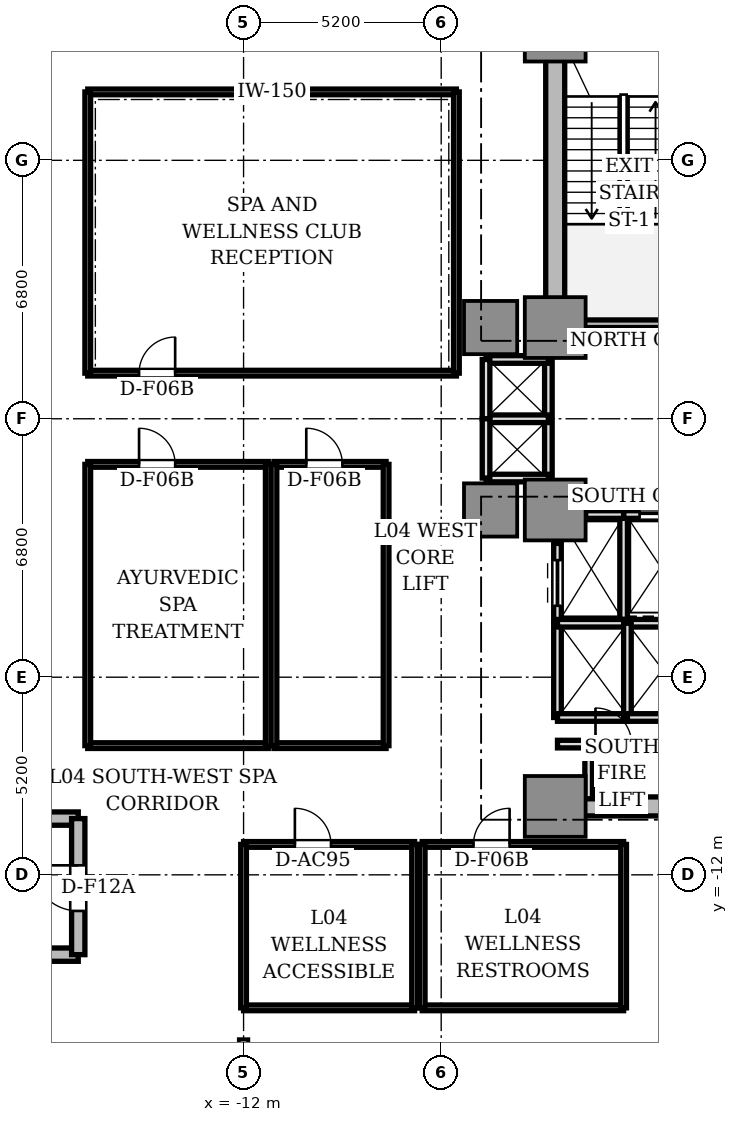
"""IFC4 building model, lengths in metres.
Left out: names, types, materials, properties, quantities, classifications, styles, units other than length and angle.
Written with IfcOpenShell. Run it as: python <this file> out.ifc"""

import sys

from ifc_helpers import new_model, si_unit, direction, frame, frame_2d, origin, origin_2d, place, context, subcontext, project, spatial, rectangle, i_section, extrude, source, transform, mapped, element, fill, save


model = new_model("IFC4")
c1 = context("Model", 3, precision=1e-05, world=origin(), true_north=direction((0.0, 1.0)))
c2 = subcontext(c1, "Body", "Model", "MODEL_VIEW")
j1 = project(units=[si_unit("LENGTHUNIT", "METRE"), si_unit("PLANEANGLEUNIT", "RADIAN")], contexts=[c1])
p1 = place(None, origin())
s1 = spatial("IfcSite", under=j1, at=p1, CompositionType="ELEMENT")
p2 = place(p1, origin())
s2 = spatial("IfcBuilding", under=s1, at=p2, CompositionType="ELEMENT")
p3 = place(p2, frame((0.0, 0.0, 18.6)))
s3 = spatial("IfcBuildingStorey", under=s2, at=p3, CompositionType="ELEMENT", Elevation=18.6)
p4 = place(p3, frame((-3.8, 2.85, 0.0), z_axis=(0.0, 0.0, 1.0), x_axis=(0.0, 1.0, 0.0)))
e1 = element("IfcWall", 1, at=p4, inside=s3, PredefinedType="SHEAR", context=c2, shape_type="SweptSolid", body=[
    extrude(rectangle(XDim=6.9, YDim=0.5, at=frame_2d((3.45, 0.0))), origin(), (0.0, 0.0, 1.0), 4.26),
])
p5 = place(p3, frame((-3.55, -10.2, 0.0), z_axis=(0.0, 0.0, 1.0), x_axis=(1.0, 0.0, 0.0)))
e2 = element("IfcWall", 2, at=p5, inside=s3, PredefinedType="SHEAR", context=c2, shape_type="SweptSolid", body=[
    extrude(rectangle(XDim=7.1, YDim=0.5, at=frame_2d((3.55, 0.0))), origin(), (0.0, 0.0, 1.0), 4.26),
])
m1 = source(origin(), c2, "Body", "SweptSolid", [
    extrude(rectangle(XDim=1.6, YDim=1.6, at=origin_2d()), origin(), (0.0, 0.0, 1.0), 4.26),
])
for number, where, z_axis, x_axis in (
    (3, (-3.8, 2.4, 0.0), (0.0, 0.0, 1.0), (1.0, 0.0, 0.0)),
    (4, (-3.8, 10.2, 0.0), (0.0, 0.0, 1.0), (1.0, 0.0, 0.0)),
    (5, (-3.8, -2.4, 0.0), (0.0, 0.0, 1.0), (1.0, 0.0, 0.0)),
    (6, (-3.8, -10.2, 0.0), (0.0, 0.0, 1.0), (1.0, 0.0, 0.0)),
):
    element("IfcColumn", number, at=place(p3, frame(where, z_axis=z_axis, x_axis=x_axis)), inside=s3, PredefinedType="COLUMN", context=c2, shape_type="MappedRepresentation", body=[
        mapped(m1, transform((0.0, 0.0, 0.0), scale=1.0)),
    ])
m2 = source(origin(), c2, "Body", "SweptSolid", [
    extrude(rectangle(XDim=1.4, YDim=1.4, at=origin_2d()), origin(), (0.0, 0.0, 1.0), 4.26),
])
for number, where, z_axis, x_axis in (
    (7, (-5.5, 2.4, 0.0), (0.0, 0.0, 1.0), (1.0, 0.0, 0.0)),
    (8, (-5.5, -2.4, 0.0), (0.0, 0.0, 1.0), (1.0, 0.0, 0.0)),
):
    element("IfcColumn", number, at=place(p3, frame(where, z_axis=z_axis, x_axis=x_axis)), inside=s3, PredefinedType="COLUMN", context=c2, shape_type="MappedRepresentation", body=[
        mapped(m2, transform((0.0, 0.0, 0.0), scale=1.0)),
    ])
m3 = source(origin(), c2, "Body", "SweptSolid", [
    extrude(i_section(OverallWidth=0.25, OverallDepth=0.35, WebThickness=0.012, FlangeThickness=0.012, FilletRadius=0.012, at=origin_2d()), origin(), (0.0, 0.0, 1.0), 4.26),
])
p6 = place(p3, frame((-12.0, -16.5, 0.0), z_axis=(0.0, 0.0, 1.0), x_axis=(1.0, 0.0, 0.0)))
e9 = element("IfcColumn", 9, at=p6, inside=s3, PredefinedType="COLUMN", context=c2, shape_type="MappedRepresentation", body=[
    mapped(m3, transform((0.0, 0.0, 0.0), scale=1.0)),
])
p7 = place(p3, frame((-3.72, 2.5, 0.0), z_axis=(0.0, 0.0, 1.0), x_axis=(1.0, 0.0, 0.0)))
e10 = element("IfcWall", 10, at=p7, inside=s3, PredefinedType="SOLIDWALL", context=c2, shape_type="SweptSolid", body=[
    extrude(rectangle(XDim=3.72, YDim=0.2, at=frame_2d((1.86, 0.0))), origin(), (0.0, 0.0, 1.0), 4.26),
])
p8 = place(p3, frame((-2.0, -5.28, 0.0), z_axis=(0.0, 0.0, 1.0), x_axis=(0.0, 1.0, 0.0)))
e11 = element("IfcWall", 11, at=p8, inside=s3, PredefinedType="SOLIDWALL", context=c2, shape_type="SweptSolid", body=[
    extrude(rectangle(XDim=2.78, YDim=0.2, at=frame_2d((1.39, 0.0))), origin(), (0.0, 0.0, 1.0), 3.81),
])
p9 = place(p3, frame((-2.0, -2.52, 0.0), z_axis=(0.0, 0.0, 1.0), x_axis=(1.0, 0.0, 0.0)))
e12 = element("IfcWall", 12, at=p9, inside=s3, PredefinedType="SOLIDWALL", context=c2, shape_type="SweptSolid", body=[
    extrude(rectangle(XDim=1.95, YDim=0.2, at=frame_2d((0.975, 0.0))), origin(), (0.0, 0.0, 1.0), 3.81),
])
p10 = place(p9, frame((0.42, 0.0, 0.0)))
e13 = element("IfcOpeningElement", 13, at=p10, cuts=e12, PredefinedType="OPENING", context=c2, shape_type="SweptSolid", body=[
    extrude(rectangle(XDim=1.1, YDim=2.2, at=frame_2d((0.55, 1.1))), frame((0.0, 0.11, 0.0), z_axis=(0.0, -1.0, 0.0), x_axis=(1.0, 0.0, 0.0)), (0.0, 0.0, 1.0), 0.22),
])
p11 = place(p3, frame((-3.0, -2.52, 0.0), z_axis=(0.0, 0.0, 1.0), x_axis=(1.0, 0.0, 0.0)))
e14 = element("IfcWall", 14, at=p11, inside=s3, PredefinedType="SOLIDWALL", context=c2, shape_type="SweptSolid", body=[
    extrude(rectangle(XDim=1.0, YDim=0.2, at=frame_2d((0.5, 0.0))), origin(), (0.0, 0.0, 1.0), 3.81),
])
p12 = place(p3, frame((-3.74, -5.36, 0.0), z_axis=(0.0, 0.0, 1.0), x_axis=(0.0, 1.0, 0.0)))
e15 = element("IfcWall", 15, at=p12, inside=s3, PredefinedType="SOLIDWALL", context=c2, shape_type="SweptSolid", body=[
    extrude(rectangle(XDim=2.08, YDim=0.2, at=frame_2d((1.04, 0.0))), origin(), (0.0, 0.0, 1.0), 3.81),
])
p13 = place(p12, frame((0.44, 0.0, 0.0)))
e16 = element("IfcOpeningElement", 16, at=p13, cuts=e15, PredefinedType="OPENING", context=c2, shape_type="SweptSolid", body=[
    extrude(rectangle(XDim=1.2, YDim=2.2, at=frame_2d((0.6, 1.1))), frame((0.0, 0.11, 0.0), z_axis=(0.0, -1.0, 0.0), x_axis=(1.0, 0.0, 0.0)), (0.0, 0.0, 1.0), 0.22),
])
p14 = place(p3, frame((-3.74, -7.86, 0.0), z_axis=(0.0, 0.0, 1.0), x_axis=(0.0, 1.0, 0.0)))
e17 = element("IfcWall", 17, at=p14, inside=s3, PredefinedType="SOLIDWALL", context=c2, shape_type="SweptSolid", body=[
    extrude(rectangle(XDim=2.48, YDim=0.2, at=frame_2d((1.24, 0.0))), origin(), (0.0, 0.0, 1.0), 3.81),
])
p15 = place(p3, frame((-3.74, -7.86, 0.0), z_axis=(0.0, 0.0, 1.0), x_axis=(1.0, 0.0, 0.0)))
e18 = element("IfcWall", 18, at=p15, inside=s3, PredefinedType="SOLIDWALL", context=c2, shape_type="SweptSolid", body=[
    extrude(rectangle(XDim=1.84, YDim=0.2, at=frame_2d((0.92, 0.0))), origin(), (0.0, 0.0, 1.0), 3.81),
])
p16 = place(p3, frame((-3.74, -5.38, 0.0), z_axis=(0.0, 0.0, 1.0), x_axis=(1.0, 0.0, 0.0)))
e19 = element("IfcWall", 19, at=p16, inside=s3, PredefinedType="SOLIDWALL", context=c2, shape_type="SweptSolid", body=[
    extrude(rectangle(XDim=3.69, YDim=0.2, at=frame_2d((1.845, 0.0))), origin(), (0.0, 0.0, 1.0), 3.81),
])
p17 = place(p3, frame((-1.9, -7.86, 0.0), z_axis=(0.0, 0.0, 1.0), x_axis=(0.0, 1.0, 0.0)))
e20 = element("IfcWall", 20, at=p17, inside=s3, PredefinedType="SOLIDWALL", context=c2, shape_type="SweptSolid", body=[
    extrude(rectangle(XDim=2.48, YDim=0.2, at=frame_2d((1.24, 0.0))), origin(), (0.0, 0.0, 1.0), 3.81),
])
p18 = place(p3, frame((-1.9, -7.86, 0.0), z_axis=(0.0, 0.0, 1.0), x_axis=(1.0, 0.0, 0.0)))
e21 = element("IfcWall", 21, at=p18, inside=s3, PredefinedType="SOLIDWALL", context=c2, shape_type="SweptSolid", body=[
    extrude(rectangle(XDim=1.85, YDim=0.2, at=frame_2d((0.925, 0.0))), origin(), (0.0, 0.0, 1.0), 3.81),
])
p19 = place(p3, frame((-3.98, -1.56, 0.0), z_axis=(0.0, 0.0, 1.0), x_axis=(0.0, 1.0, 0.0)))
e22 = element("IfcWall", 22, at=p19, inside=s3, PredefinedType="SOLIDWALL", context=c2, shape_type="SweptSolid", body=[
    extrude(rectangle(XDim=3.12, YDim=0.2, at=frame_2d((1.56, 0.0))), origin(), (0.0, 0.0, 1.0), 3.33),
])
for number, where, z_axis, x_axis in (
    (23, (-5.62, 1.56, 0.0), (0.0, 0.0, 1.0), (1.0, 0.0, 0.0)),
    (24, (-5.62, -1.56, 0.0), (0.0, 0.0, 1.0), (1.0, 0.0, 0.0)),
    (25, (-5.62, 0.0, 0.0), (0.0, 0.0, 1.0), (1.0, 0.0, 0.0)),
):
    element("IfcWall", number, at=place(p3, frame(where, z_axis=z_axis, x_axis=x_axis)), inside=s3, PredefinedType="SOLIDWALL", context=c2, shape_type="SweptSolid", body=[
        extrude(rectangle(XDim=1.64, YDim=0.2, at=frame_2d((0.82, 0.0))), origin(), (0.0, 0.0, 1.0), 3.81),
    ])
for number, where, z_axis, x_axis in (
    (26, (-5.62, 0.0, 0.0), (0.0, 0.0, 1.0), (0.0, 1.0, 0.0)),
    (27, (-5.62, -1.56, 0.0), (0.0, 0.0, 1.0), (0.0, 1.0, 0.0)),
):
    element("IfcWall", number, at=place(p3, frame(where, z_axis=z_axis, x_axis=x_axis)), inside=s3, PredefinedType="SOLIDWALL", context=c2, shape_type="SweptSolid", body=[
        extrude(rectangle(XDim=1.56, YDim=0.2, at=frame_2d((0.78, 0.0))), origin(), (0.0, 0.0, 1.0), 3.81),
    ])
p20 = place(p3, frame((-3.74, -8.56, 0.0), z_axis=(0.0, 0.0, 1.0), x_axis=(1.0, 0.0, 0.0)))
e28 = element("IfcWall", 28, at=p20, inside=s3, PredefinedType="SOLIDWALL", context=c2, shape_type="SweptSolid", body=[
    extrude(rectangle(XDim=3.62, YDim=0.2, at=frame_2d((1.81, 0.0))), origin(), (0.0, 0.0, 1.0), 3.81),
])
p21 = place(p20, frame((1.0, 0.0, 0.0)))
e29 = element("IfcOpeningElement", 29, at=p21, cuts=e28, PredefinedType="OPENING", context=c2, shape_type="SweptSolid", body=[
    extrude(rectangle(XDim=0.95, YDim=2.15, at=frame_2d((0.475, 1.075))), frame((0.0, 0.11, 0.0), z_axis=(0.0, -1.0, 0.0), x_axis=(1.0, 0.0, 0.0)), (0.0, 0.0, 1.0), 0.22),
])
p22 = place(p3, frame((-2.92, -10.0, 0.0), z_axis=(0.0, 0.0, 1.0), x_axis=(0.0, 1.0, 0.0)))
e30 = element("IfcWall", 30, at=p22, inside=s3, PredefinedType="SOLIDWALL", context=c2, shape_type="SweptSolid", body=[
    extrude(rectangle(XDim=1.44, YDim=0.2, at=frame_2d((0.72, 0.0))), origin(), (0.0, 0.0, 1.0), 3.81),
])
for number, where, z_axis, x_axis in (
    (31, (-26.6, -10.52, 0.0), (0.0, 0.0, 1.0), (1.0, 0.0, 0.0)),
    (32, (-26.6, -14.1, 0.0), (0.0, 0.0, 1.0), (1.0, 0.0, 0.0)),
):
    element("IfcWall", number, at=place(p3, frame(where, z_axis=z_axis, x_axis=x_axis)), inside=s3, PredefinedType="SHEAR", context=c2, shape_type="SweptSolid", body=[
        extrude(rectangle(XDim=10.25, YDim=0.35, at=frame_2d((5.125, 0.0))), origin(), (0.0, 0.0, 1.0), 4.26),
    ])
p23 = place(p3, frame((-16.35, -14.1, 0.0), z_axis=(0.0, 0.0, 1.0), x_axis=(0.0, 1.0, 0.0)))
e33 = element("IfcWall", 33, at=p23, inside=s3, PredefinedType="SHEAR", context=c2, shape_type="SweptSolid", body=[
    extrude(rectangle(XDim=3.58, YDim=0.35, at=frame_2d((1.79, 0.0))), origin(), (0.0, 0.0, 1.0), 4.26),
])
p24 = place(p23, frame((1.15, 0.0, 0.0)))
e34 = element("IfcOpeningElement", 34, at=p24, cuts=e33, PredefinedType="OPENING", context=c2, shape_type="SweptSolid", body=[
    extrude(rectangle(XDim=1.2, YDim=2.2, at=frame_2d((0.6, 1.1))), frame((0.0, 0.185, 0.0), z_axis=(0.0, -1.0, 0.0), x_axis=(1.0, 0.0, 0.0)), (0.0, 0.0, 1.0), 0.37),
])
p25 = place(p3, frame((-16.1, 8.6, 0.0), z_axis=(0.0, 0.0, 1.0), x_axis=(1.0, 0.0, 0.0)))
e35 = element("IfcWall", 35, at=p25, inside=s3, PredefinedType="PARTITIONING", context=c2, shape_type="SweptSolid", body=[
    extrude(rectangle(XDim=9.7, YDim=0.15, at=frame_2d((4.85, 0.0))), origin(), (0.0, 0.0, 1.0), 3.81),
])
p26 = place(p3, frame((-16.1, 1.2, 0.0), z_axis=(0.0, 0.0, 1.0), x_axis=(1.0, 0.0, 0.0)))
e36 = element("IfcWall", 36, at=p26, inside=s3, PredefinedType="PARTITIONING", context=c2, shape_type="SweptSolid", body=[
    extrude(rectangle(XDim=9.7, YDim=0.15, at=frame_2d((4.85, 0.0))), origin(), (0.0, 0.0, 1.0), 3.81),
])
p27 = place(p26, frame((1.35, 0.0, 0.0)))
e37 = element("IfcOpeningElement", 37, at=p27, cuts=e36, PredefinedType="OPENING", context=c2, shape_type="SweptSolid", body=[
    extrude(rectangle(XDim=0.95, YDim=2.15, at=frame_2d((0.475, 1.075))), frame((0.0, 0.085, 0.0), z_axis=(0.0, -1.0, 0.0), x_axis=(1.0, 0.0, 0.0)), (0.0, 0.0, 1.0), 0.17),
])
for number, where, z_axis, x_axis in (
    (38, (-16.1, 1.2, 0.0), (0.0, 0.0, 1.0), (0.0, 1.0, 0.0)),
    (39, (-6.4, 1.2, 0.0), (0.0, 0.0, 1.0), (0.0, 1.0, 0.0)),
):
    element("IfcWall", number, at=place(p3, frame(where, z_axis=z_axis, x_axis=x_axis)), inside=s3, PredefinedType="PARTITIONING", context=c2, shape_type="SweptSolid", body=[
        extrude(rectangle(XDim=7.4, YDim=0.15, at=frame_2d((3.7, 0.0))), origin(), (0.0, 0.0, 1.0), 3.81),
    ])
p28 = place(p3, frame((-16.1, -1.2, 0.0), z_axis=(0.0, 0.0, 1.0), x_axis=(1.0, 0.0, 0.0)))
e40 = element("IfcWall", 40, at=p28, inside=s3, PredefinedType="PARTITIONING", context=c2, shape_type="SweptSolid", body=[
    extrude(rectangle(XDim=4.75, YDim=0.15, at=frame_2d((2.375, 0.0))), origin(), (0.0, 0.0, 1.0), 3.81),
])
p29 = place(p28, frame((1.35, 0.0, 0.0)))
e41 = element("IfcOpeningElement", 41, at=p29, cuts=e40, PredefinedType="OPENING", context=c2, shape_type="SweptSolid", body=[
    extrude(rectangle(XDim=0.95, YDim=2.15, at=frame_2d((0.475, 1.075))), frame((0.0, 0.085, 0.0), z_axis=(0.0, -1.0, 0.0), x_axis=(1.0, 0.0, 0.0)), (0.0, 0.0, 1.0), 0.17),
])
p30 = place(p3, frame((-16.1, -8.6, 0.0), z_axis=(0.0, 0.0, 1.0), x_axis=(1.0, 0.0, 0.0)))
e42 = element("IfcWall", 42, at=p30, inside=s3, PredefinedType="PARTITIONING", context=c2, shape_type="SweptSolid", body=[
    extrude(rectangle(XDim=4.75, YDim=0.15, at=frame_2d((2.375, 0.0))), origin(), (0.0, 0.0, 1.0), 3.81),
])
for number, where, z_axis, x_axis in (
    (43, (-16.1, -8.6, 0.0), (0.0, 0.0, 1.0), (0.0, 1.0, 0.0)),
    (44, (-11.35, -8.6, 0.0), (0.0, 0.0, 1.0), (0.0, 1.0, 0.0)),
):
    element("IfcWall", number, at=place(p3, frame(where, z_axis=z_axis, x_axis=x_axis)), inside=s3, PredefinedType="PARTITIONING", context=c2, shape_type="SweptSolid", body=[
        extrude(rectangle(XDim=7.4, YDim=0.15, at=frame_2d((3.7, 0.0))), origin(), (0.0, 0.0, 1.0), 3.81),
    ])
p31 = place(p3, frame((-12.0, -11.2, 0.0), z_axis=(0.0, 0.0, 1.0), x_axis=(1.0, 0.0, 0.0)))
e45 = element("IfcWall", 45, at=p31, inside=s3, PredefinedType="PARTITIONING", context=c2, shape_type="SweptSolid", body=[
    extrude(rectangle(XDim=4.5, YDim=0.15, at=frame_2d((2.25, 0.0))), origin(), (0.0, 0.0, 1.0), 3.81),
])
p32 = place(p31, frame((1.35, 0.0, 0.0)))
e46 = element("IfcOpeningElement", 46, at=p32, cuts=e45, PredefinedType="OPENING", context=c2, shape_type="SweptSolid", body=[
    extrude(rectangle(XDim=0.95, YDim=2.15, at=frame_2d((0.475, 1.075))), frame((0.0, 0.085, 0.0), z_axis=(0.0, -1.0, 0.0), x_axis=(1.0, 0.0, 0.0)), (0.0, 0.0, 1.0), 0.17),
])
p33 = place(p3, frame((-12.0, -15.5, 0.0), z_axis=(0.0, 0.0, 1.0), x_axis=(1.0, 0.0, 0.0)))
e47 = element("IfcWall", 47, at=p33, inside=s3, PredefinedType="PARTITIONING", context=c2, shape_type="SweptSolid", body=[
    extrude(rectangle(XDim=4.5, YDim=0.15, at=frame_2d((2.25, 0.0))), origin(), (0.0, 0.0, 1.0), 3.81),
])
for number, where, z_axis, x_axis in (
    (48, (-12.0, -15.5, 0.0), (0.0, 0.0, 1.0), (0.0, 1.0, 0.0)),
    (49, (-7.5, -15.5, 0.0), (0.0, 0.0, 1.0), (0.0, 1.0, 0.0)),
):
    element("IfcWall", number, at=place(p3, frame(where, z_axis=z_axis, x_axis=x_axis)), inside=s3, PredefinedType="PARTITIONING", context=c2, shape_type="SweptSolid", body=[
        extrude(rectangle(XDim=4.3, YDim=0.15, at=frame_2d((2.15, 0.0))), origin(), (0.0, 0.0, 1.0), 3.81),
    ])
p34 = place(p3, frame((-7.3, -11.2, 0.0), z_axis=(0.0, 0.0, 1.0), x_axis=(1.0, 0.0, 0.0)))
e50 = element("IfcWall", 50, at=p34, inside=s3, PredefinedType="PARTITIONING", context=c2, shape_type="SweptSolid", body=[
    extrude(rectangle(XDim=5.3, YDim=0.15, at=frame_2d((2.65, 0.0))), origin(), (0.0, 0.0, 1.0), 3.81),
])
p35 = place(p34, frame((1.35, 0.0, 0.0)))
e51 = element("IfcOpeningElement", 51, at=p35, cuts=e50, PredefinedType="OPENING", context=c2, shape_type="SweptSolid", body=[
    extrude(rectangle(XDim=0.95, YDim=2.15, at=frame_2d((0.475, 1.075))), frame((0.0, 0.085, 0.0), z_axis=(0.0, -1.0, 0.0), x_axis=(1.0, 0.0, 0.0)), (0.0, 0.0, 1.0), 0.17),
])
p36 = place(p3, frame((-7.3, -15.5, 0.0), z_axis=(0.0, 0.0, 1.0), x_axis=(1.0, 0.0, 0.0)))
e52 = element("IfcWall", 52, at=p36, inside=s3, PredefinedType="PARTITIONING", context=c2, shape_type="SweptSolid", body=[
    extrude(rectangle(XDim=5.3, YDim=0.15, at=frame_2d((2.65, 0.0))), origin(), (0.0, 0.0, 1.0), 3.81),
])
for number, where, z_axis, x_axis in (
    (53, (-7.3, -15.5, 0.0), (0.0, 0.0, 1.0), (0.0, 1.0, 0.0)),
    (54, (-2.0, -15.5, 0.0), (0.0, 0.0, 1.0), (0.0, 1.0, 0.0)),
):
    element("IfcWall", number, at=place(p3, frame(where, z_axis=z_axis, x_axis=x_axis)), inside=s3, PredefinedType="PARTITIONING", context=c2, shape_type="SweptSolid", body=[
        extrude(rectangle(XDim=4.3, YDim=0.15, at=frame_2d((2.15, 0.0))), origin(), (0.0, 0.0, 1.0), 3.81),
    ])
p37 = place(p3, frame((-11.2, -1.2, 0.0), z_axis=(0.0, 0.0, 1.0), x_axis=(1.0, 0.0, 0.0)))
e55 = element("IfcWall", 55, at=p37, inside=s3, PredefinedType="PARTITIONING", context=c2, shape_type="SweptSolid", body=[
    extrude(rectangle(XDim=2.95, YDim=0.15, at=frame_2d((1.475, 0.0))), origin(), (0.0, 0.0, 1.0), 3.81),
])
p38 = place(p37, frame((0.85, 0.0, 0.0)))
e56 = element("IfcOpeningElement", 56, at=p38, cuts=e55, PredefinedType="OPENING", context=c2, shape_type="SweptSolid", body=[
    extrude(rectangle(XDim=0.95, YDim=2.15, at=frame_2d((0.475, 1.075))), frame((0.0, 0.085, 0.0), z_axis=(0.0, -1.0, 0.0), x_axis=(1.0, 0.0, 0.0)), (0.0, 0.0, 1.0), 0.17),
])
p39 = place(p3, frame((-11.2, -8.6, 0.0), z_axis=(0.0, 0.0, 1.0), x_axis=(1.0, 0.0, 0.0)))
e57 = element("IfcWall", 57, at=p39, inside=s3, PredefinedType="PARTITIONING", context=c2, shape_type="SweptSolid", body=[
    extrude(rectangle(XDim=2.95, YDim=0.15, at=frame_2d((1.475, 0.0))), origin(), (0.0, 0.0, 1.0), 3.81),
])
for number, where, z_axis, x_axis in (
    (58, (-11.2, -8.6, 0.0), (0.0, 0.0, 1.0), (0.0, 1.0, 0.0)),
    (59, (-8.25, -8.6, 0.0), (0.0, 0.0, 1.0), (0.0, 1.0, 0.0)),
):
    element("IfcWall", number, at=place(p3, frame(where, z_axis=z_axis, x_axis=x_axis)), inside=s3, PredefinedType="PARTITIONING", context=c2, shape_type="SweptSolid", body=[
        extrude(rectangle(XDim=7.4, YDim=0.15, at=frame_2d((3.7, 0.0))), origin(), (0.0, 0.0, 1.0), 3.81),
    ])
m4 = source(origin(), c2, "Body", "SweptSolid", [
    extrude(rectangle(XDim=1.1, YDim=0.05, at=origin_2d()), origin(), (0.0, 0.0, 1.0), 2.2),
])
p40 = place(p10, frame((0.55, 0.0, 0.0)))
e60 = element("IfcDoor", 60, at=p40, inside=s3, OperationType="DOUBLE_DOOR_SLIDING", PredefinedType="DOOR", context=c2, shape_type="MappedRepresentation", body=[
    mapped(m4, transform((0.0, 0.0, 0.0), scale=1.0)),
])
fill(e13, e60)
m5 = source(origin(), c2, "Body", "SweptSolid", [
    extrude(rectangle(XDim=1.2, YDim=0.05, at=origin_2d()), origin(), (0.0, 0.0, 1.0), 2.2),
])
p41 = place(p13, frame((0.6, 0.0, 0.0)))
e61 = element("IfcDoor", 61, at=p41, inside=s3, OperationType="DOUBLE_DOOR_SLIDING", PredefinedType="DOOR", context=c2, shape_type="MappedRepresentation", body=[
    mapped(m5, transform((0.0, 0.0, 0.0), scale=1.0)),
])
fill(e16, e61)
m6 = source(origin(), c2, "Body", "SweptSolid", [
    extrude(rectangle(XDim=0.95, YDim=0.05, at=origin_2d()), origin(), (0.0, 0.0, 1.0), 2.15),
])
p42 = place(p21, frame((0.475, 0.0, 0.0)))
e62 = element("IfcDoor", 62, at=p42, inside=s3, OperationType="SINGLE_SWING_LEFT", PredefinedType="DOOR", context=c2, shape_type="MappedRepresentation", body=[
    mapped(m6, transform((0.0, 0.0, 0.0), scale=1.0)),
])
fill(e29, e62)
p43 = place(p24, frame((0.6, 0.0, 0.0)))
e63 = element("IfcDoor", 63, at=p43, inside=s3, OperationType="SINGLE_SWING_RIGHT", PredefinedType="DOOR", context=c2, shape_type="MappedRepresentation", body=[
    mapped(m5, transform((0.0, 0.0, 0.0), scale=1.0)),
])
fill(e34, e63)
p44 = place(p27, frame((0.475, 0.0, 0.0)))
e64 = element("IfcDoor", 64, at=p44, inside=s3, OperationType="SINGLE_SWING_RIGHT", PredefinedType="DOOR", context=c2, shape_type="MappedRepresentation", body=[
    mapped(m6, transform((0.0, 0.0, 0.0), scale=1.0)),
])
fill(e37, e64)
p45 = place(p29, frame((0.475, 0.0, 0.0)))
e65 = element("IfcDoor", 65, at=p45, inside=s3, OperationType="SINGLE_SWING_LEFT", PredefinedType="DOOR", context=c2, shape_type="MappedRepresentation", body=[
    mapped(m6, transform((0.0, 0.0, 0.0), scale=1.0)),
])
fill(e41, e65)
p46 = place(p32, frame((0.475, 0.0, 0.0)))
e66 = element("IfcDoor", 66, at=p46, inside=s3, OperationType="SINGLE_SWING_LEFT", PredefinedType="DOOR", context=c2, shape_type="MappedRepresentation", body=[
    mapped(m6, transform((0.0, 0.0, 0.0), scale=1.0)),
])
fill(e46, e66)
p47 = place(p35, frame((0.475, 0.0, 0.0)))
e67 = element("IfcDoor", 67, at=p47, inside=s3, OperationType="SINGLE_SWING_RIGHT", PredefinedType="DOOR", context=c2, shape_type="MappedRepresentation", body=[
    mapped(m6, transform((0.0, 0.0, 0.0), scale=1.0)),
])
fill(e51, e67)
p48 = place(p38, frame((0.475, 0.0, 0.0)))
e68 = element("IfcDoor", 68, at=p48, inside=s3, OperationType="SINGLE_SWING_LEFT", PredefinedType="DOOR", context=c2, shape_type="MappedRepresentation", body=[
    mapped(m6, transform((0.0, 0.0, 0.0), scale=1.0)),
])
fill(e56, e68)
save(model, sys.argv[1])
